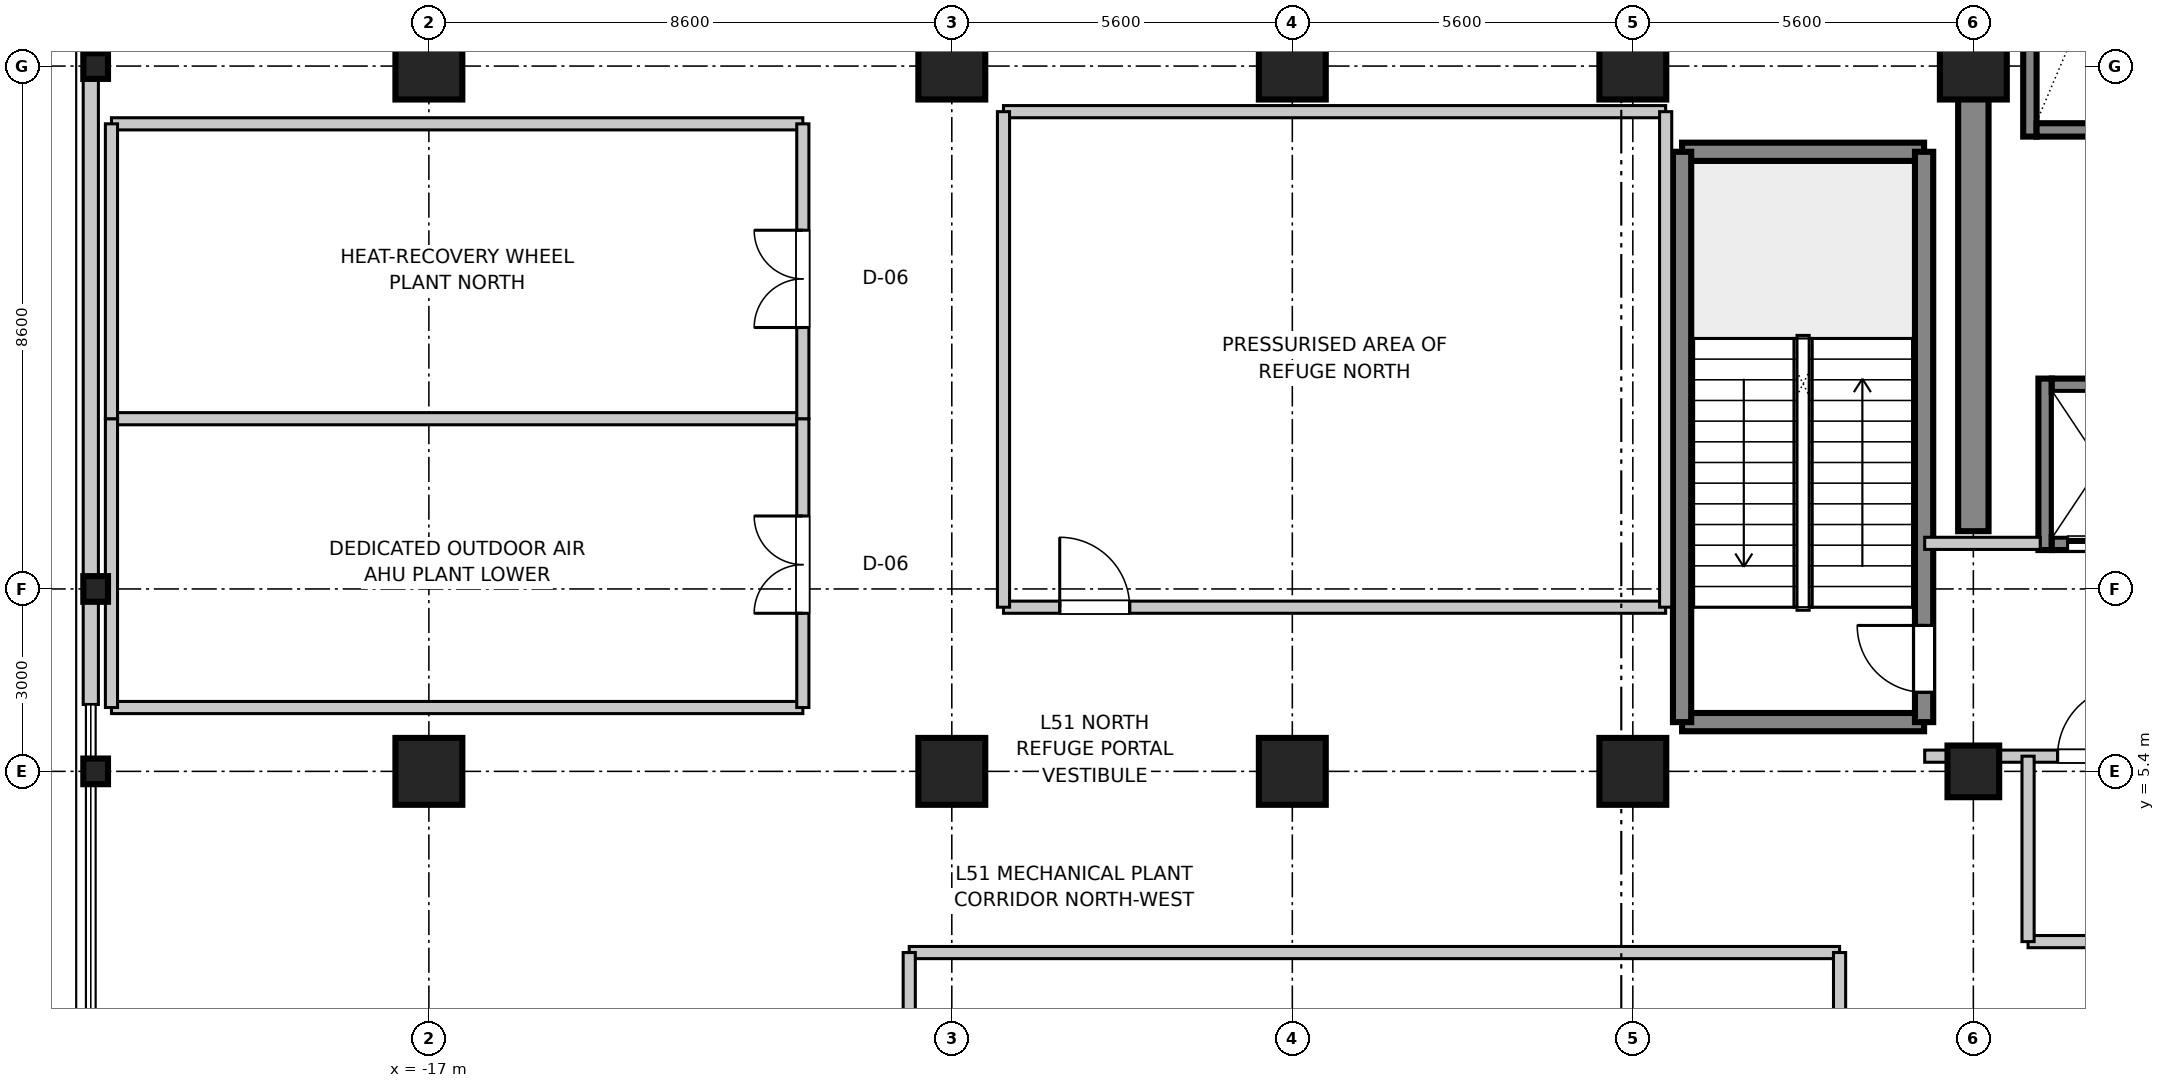
"""IFC4 building model, lengths in metres.
Left out: names, types, materials, properties, quantities, classifications, styles, units other than length and angle.
Written with IfcOpenShell. Run it as: python <this file> out.ifc"""

import sys

from ifc_helpers import new_model, si_unit, direction, frame, frame_2d, origin, origin_2d, place, context, subcontext, project, spatial, rectangle, i_section, extrude, source, transform, mapped, element, fill, save


model = new_model("IFC4")
c1 = context("Model", 3, precision=1e-05, world=origin(), true_north=direction((0.0, 1.0)))
c2 = subcontext(c1, "Body", "Model", "MODEL_VIEW")
j1 = project(units=[si_unit("LENGTHUNIT", "METRE"), si_unit("PLANEANGLEUNIT", "RADIAN")], contexts=[c1])
p1 = place(None, origin())
s1 = spatial("IfcSite", under=j1, at=p1, CompositionType="ELEMENT")
p2 = place(p1, origin())
s2 = spatial("IfcBuilding", under=s1, at=p2, CompositionType="ELEMENT")
p3 = place(p2, frame((0.0, 0.0, 200.1)))
s3 = spatial("IfcBuildingStorey", under=s2, at=p3, CompositionType="ELEMENT", Elevation=200.1)
m1 = source(origin(), c2, "Body", "SweptSolid", [
    extrude(rectangle(XDim=1.1, YDim=1.1, at=origin_2d()), origin(), (0.0, 0.0, 1.0), 4.755),
])
for number, where, z_axis, x_axis in (
    (1, (-17.0, 5.4, 0.0), (0.0, 0.0, 1.0), (1.0, 0.0, 0.0)),
    (2, (-17.0, 17.0, 0.0), (0.0, 0.0, 1.0), (1.0, 0.0, 0.0)),
    (3, (-8.4, 5.4, 0.0), (0.0, 0.0, 1.0), (1.0, 0.0, 0.0)),
    (4, (-8.4, 17.0, 0.0), (0.0, 0.0, 1.0), (1.0, 0.0, 0.0)),
    (5, (-2.8, 5.4, 0.0), (0.0, 0.0, 1.0), (1.0, 0.0, 0.0)),
    (6, (-2.8, 17.0, 0.0), (0.0, 0.0, 1.0), (1.0, 0.0, 0.0)),
    (7, (2.8, 5.4, 0.0), (0.0, 0.0, 1.0), (1.0, 0.0, 0.0)),
    (8, (2.8, 17.0, 0.0), (0.0, 0.0, 1.0), (1.0, 0.0, 0.0)),
):
    element("IfcColumn", number, at=place(p3, frame(where, z_axis=z_axis, x_axis=x_axis)), inside=s3, PredefinedType="COLUMN", context=c2, shape_type="MappedRepresentation", body=[
        mapped(m1, transform((0.0, 0.0, 0.0), scale=1.0)),
    ])
m2 = source(origin(), c2, "Body", "SweptSolid", [
    extrude(rectangle(XDim=0.85, YDim=0.85, at=origin_2d()), origin(), (0.0, 0.0, 1.0), 4.755),
])
p4 = place(p3, frame((8.4, 5.4, 0.0), z_axis=(0.0, 0.0, 1.0), x_axis=(1.0, 0.0, 0.0)))
e9 = element("IfcColumn", 9, at=p4, inside=s3, PredefinedType="PILASTER", context=c2, shape_type="MappedRepresentation", body=[
    mapped(m2, transform((0.0, 0.0, 0.0), scale=1.0)),
])
p5 = place(p3, frame((8.4, 17.0, 0.0), z_axis=(0.0, 0.0, 1.0), x_axis=(1.0, 0.0, 0.0)))
e10 = element("IfcColumn", 10, at=p5, inside=s3, PredefinedType="COLUMN", context=c2, shape_type="MappedRepresentation", body=[
    mapped(m1, transform((0.0, 0.0, 0.0), scale=1.0)),
])
m3 = source(origin(), c2, "Body", "SweptSolid", [
    extrude(i_section(OverallWidth=0.406, OverallDepth=0.422, WebThickness=0.019, FlangeThickness=0.03, at=origin_2d()), origin(), (0.0, 0.0, 1.0), 4.861),
])
for number, where, z_axis, x_axis in (
    (11, (-22.48, 5.4, 0.0), (-0.288, 0.0, 0.958), (0.0, -1.0, 0.0)),
    (12, (-22.48, 8.4, 0.0), (-0.288, 0.0, 0.958), (0.0, -1.0, 0.0)),
    (13, (-22.48, 17.0, 0.0), (-0.288, 0.0, 0.958), (0.0, -1.0, 0.0)),
):
    element("IfcColumn", number, at=place(p3, frame(where, z_axis=z_axis, x_axis=x_axis)), inside=s3, PredefinedType="COLUMN", context=c2, shape_type="MappedRepresentation", body=[
        mapped(m3, transform((0.0, 0.0, 0.0), scale=1.0)),
    ])
m4 = source(origin(), c2, "Body", "SweptSolid", [
    extrude(rectangle(XDim=7.65, YDim=0.5, at=frame_2d((3.825, 0.0))), origin(), (0.0, 0.0, 1.0), 4.51),
])
p6 = place(p3, frame((8.4, 9.35, 0.0), z_axis=(0.0, 0.0, 1.0), x_axis=(0.0, 1.0, 0.0)))
e14 = element("IfcWall", 14, at=p6, inside=s3, PredefinedType="SHEAR", context=c2, shape_type="MappedRepresentation", body=[
    mapped(m4, transform((0.0, 0.0, 0.0), scale=1.0)),
])
m5 = source(origin(), c2, "Body", "SweptSolid", [
    extrude(rectangle(XDim=3.98, YDim=0.3, at=frame_2d((1.99, 0.0))), origin(), (0.0, 0.0, 1.0), 4.51),
])
for number, where, z_axis, x_axis in (
    (15, (3.61, 6.21, 0.0), (0.0, 0.0, 1.0), (1.0, 0.0, 0.0)),
    (16, (3.61, 15.59, 0.0), (0.0, 0.0, 1.0), (1.0, 0.0, 0.0)),
):
    element("IfcWall", number, at=place(p3, frame(where, z_axis=z_axis, x_axis=x_axis)), inside=s3, PredefinedType="SHEAR", context=c2, shape_type="MappedRepresentation", body=[
        mapped(m5, transform((0.0, 0.0, 0.0), scale=1.0)),
    ])
m6 = source(origin(), c2, "Body", "SweptSolid", [
    extrude(rectangle(XDim=9.38, YDim=0.3, at=frame_2d((4.69, 0.0))), origin(), (0.0, 0.0, 1.0), 4.51),
])
p7 = place(p3, frame((3.61, 6.21, 0.0), z_axis=(0.0, 0.0, 1.0), x_axis=(0.0, 1.0, 0.0)))
e17 = element("IfcWall", 17, at=p7, inside=s3, PredefinedType="SHEAR", context=c2, shape_type="MappedRepresentation", body=[
    mapped(m6, transform((0.0, 0.0, 0.0), scale=1.0)),
])
p8 = place(p3, frame((7.59, 6.21, 0.0), z_axis=(0.0, 0.0, 1.0), x_axis=(0.0, 1.0, 0.0)))
e18 = element("IfcWall", 18, at=p8, inside=s3, PredefinedType="SHEAR", context=c2, shape_type="MappedRepresentation", body=[
    mapped(m6, transform((0.0, 0.0, 0.0), scale=1.0)),
])
p9 = place(p8, frame((0.49, 0.0, 0.0)))
e19 = element("IfcOpeningElement", 19, at=p9, cuts=e18, PredefinedType="OPENING", context=c2, shape_type="SweptSolid", body=[
    extrude(rectangle(XDim=1.1, YDim=2.15, at=frame_2d((0.55, 1.075))), frame((0.0, 0.16, 0.0), z_axis=(0.0, -1.0, 0.0), x_axis=(1.0, 0.0, 0.0)), (0.0, 0.0, 1.0), 0.32),
])
m7 = source(origin(), c2, "Body", "SweptSolid", [
    extrude(rectangle(XDim=2.385, YDim=0.22, at=frame_2d((1.192, 0.0))), origin(), (0.0, 0.0, 1.0), 4.51),
])
p10 = place(p3, frame((9.33, 15.84, 0.0), z_axis=(0.0, 0.0, 1.0), x_axis=(0.0, 1.0, 0.0)))
e20 = element("IfcWall", 20, at=p10, inside=s3, PredefinedType="SHEAR", context=c2, shape_type="MappedRepresentation", body=[
    mapped(m7, transform((0.0, 0.0, 0.0), scale=1.0)),
])
m8 = source(origin(), c2, "Body", "SweptSolid", [
    extrude(rectangle(XDim=1.82, YDim=0.22, at=frame_2d((0.91, 0.0))), origin(), (0.0, 0.0, 1.0), 4.51),
])
p11 = place(p3, frame((9.44, 15.95, 0.0), z_axis=(0.0, 0.0, 1.0), x_axis=(1.0, 0.0, 0.0)))
e21 = element("IfcWall", 21, at=p11, inside=s3, PredefinedType="SHEAR", context=c2, shape_type="MappedRepresentation", body=[
    mapped(m8, transform((0.0, 0.0, 0.0), scale=1.0)),
])
m9 = source(origin(), c2, "Body", "SweptSolid", [
    extrude(rectangle(XDim=2.82, YDim=0.22, at=frame_2d((1.41, 0.0))), origin(), (0.0, 0.0, 1.0), 4.51),
])
p12 = place(p3, frame((9.58, 9.04, 0.0), z_axis=(0.0, 0.0, 1.0), x_axis=(0.0, 1.0, 0.0)))
e22 = element("IfcWall", 22, at=p12, inside=s3, PredefinedType="SHEAR", context=c2, shape_type="MappedRepresentation", body=[
    mapped(m9, transform((0.0, 0.0, 0.0), scale=1.0)),
])
m10 = source(origin(), c2, "Body", "SweptSolid", [
    extrude(rectangle(XDim=1.62, YDim=0.22, at=frame_2d((0.81, 0.0))), origin(), (0.0, 0.0, 1.0), 4.51),
])
p13 = place(p3, frame((9.69, 9.15, 0.0), z_axis=(0.0, 0.0, 1.0), x_axis=(1.0, 0.0, 0.0)))
e23 = element("IfcWall", 23, at=p13, inside=s3, PredefinedType="SHEAR", context=c2, shape_type="MappedRepresentation", body=[
    mapped(m10, transform((0.0, 0.0, 0.0), scale=1.0)),
])
p14 = place(p13, frame((0.26, 0.0, 0.0)))
e24 = element("IfcOpeningElement", 24, at=p14, cuts=e23, PredefinedType="OPENING", context=c2, shape_type="SweptSolid", body=[
    extrude(rectangle(XDim=1.1, YDim=2.2, at=frame_2d((0.55, 1.1))), frame((0.0, 0.12, 0.0), z_axis=(0.0, -1.0, 0.0), x_axis=(1.0, 0.0, 0.0)), (0.0, 0.0, 1.0), 0.24),
])
p15 = place(p3, frame((9.69, 11.75, 0.0), z_axis=(0.0, 0.0, 1.0), x_axis=(1.0, 0.0, 0.0)))
e25 = element("IfcWall", 25, at=p15, inside=s3, PredefinedType="SHEAR", context=c2, shape_type="MappedRepresentation", body=[
    mapped(m10, transform((0.0, 0.0, 0.0), scale=1.0)),
])
m11 = source(origin(), c2, "Body", "SweptSolid", [
    extrude(rectangle(XDim=13.26, YDim=0.25, at=frame_2d((6.63, 0.0))), origin(), (0.0, 0.0, 1.0), 3.99),
])
p16 = place(p3, frame((-22.56, 6.5, 0.0), z_axis=(0.0, 0.0, 1.0), x_axis=(0.0, 1.0, 0.0)))
e26 = element("IfcWall", 26, at=p16, inside=s3, PredefinedType="STANDARD", context=c2, shape_type="MappedRepresentation", body=[
    mapped(m11, transform((0.0, 0.0, 0.0), scale=1.0)),
])
m12 = source(origin(), c2, "Body", "SweptSolid", [
    extrude(rectangle(XDim=3.82, YDim=0.2, at=frame_2d((1.91, 0.0))), origin(), (0.0, 0.0, 1.0), 3.4),
])
p17 = place(p3, frame((7.6, 5.65, 0.0), z_axis=(0.0, 0.0, 1.0), x_axis=(1.0, 0.0, 0.0)))
e27 = element("IfcWall", 27, at=p17, inside=s3, PredefinedType="PARTITIONING", context=c2, shape_type="MappedRepresentation", body=[
    mapped(m12, transform((0.0, 0.0, 0.0), scale=1.0)),
])
p18 = place(p17, frame((2.185, 0.0, 0.0)))
e28 = element("IfcOpeningElement", 28, at=p18, cuts=e27, PredefinedType="OPENING", context=c2, shape_type="SweptSolid", body=[
    extrude(rectangle(XDim=1.15, YDim=2.15, at=frame_2d((0.575, 1.075))), frame((0.0, 0.11, 0.0), z_axis=(0.0, -1.0, 0.0), x_axis=(1.0, 0.0, 0.0)), (0.0, 0.0, 1.0), 0.22),
])
m13 = source(origin(), c2, "Body", "SweptSolid", [
    extrude(rectangle(XDim=1.9, YDim=0.2, at=frame_2d((0.95, 0.0))), origin(), (0.0, 0.0, 1.0), 3.4),
])
p19 = place(p3, frame((7.6, 9.15, 0.0), z_axis=(0.0, 0.0, 1.0), x_axis=(1.0, 0.0, 0.0)))
e29 = element("IfcWall", 29, at=p19, inside=s3, PredefinedType="PARTITIONING", context=c2, shape_type="MappedRepresentation", body=[
    mapped(m13, transform((0.0, 0.0, 0.0), scale=1.0)),
])
m14 = source(origin(), c2, "Body", "SweptSolid", [
    extrude(rectangle(XDim=2.12, YDim=0.2, at=frame_2d((1.06, 0.0))), origin(), (0.0, 0.0, 1.0), 3.4),
])
p20 = place(p3, frame((9.3, 2.6, 0.0), z_axis=(0.0, 0.0, 1.0), x_axis=(1.0, 0.0, 0.0)))
e30 = element("IfcWall", 30, at=p20, inside=s3, PredefinedType="PARTITIONING", context=c2, shape_type="MappedRepresentation", body=[
    mapped(m14, transform((0.0, 0.0, 0.0), scale=1.0)),
])
m15 = source(origin(), c2, "Body", "SweptSolid", [
    extrude(rectangle(XDim=3.05, YDim=0.2, at=frame_2d((1.525, 0.0))), origin(), (0.0, 0.0, 1.0), 3.4),
])
p21 = place(p3, frame((9.3, 2.6, 0.0), z_axis=(0.0, 0.0, 1.0), x_axis=(0.0, 1.0, 0.0)))
e31 = element("IfcWall", 31, at=p21, inside=s3, PredefinedType="PARTITIONING", context=c2, shape_type="MappedRepresentation", body=[
    mapped(m15, transform((0.0, 0.0, 0.0), scale=1.0)),
])
m16 = source(origin(), c2, "Body", "SweptSolid", [
    extrude(rectangle(XDim=10.89, YDim=0.2, at=frame_2d((5.445, 0.0))), origin(), (0.0, 0.0, 1.0), 3.4),
])
p22 = place(p3, frame((-7.55, 8.1, 0.0), z_axis=(0.0, 0.0, 1.0), x_axis=(1.0, 0.0, 0.0)))
e32 = element("IfcWall", 32, at=p22, inside=s3, PredefinedType="PARTITIONING", context=c2, shape_type="MappedRepresentation", body=[
    mapped(m16, transform((0.0, 0.0, 0.0), scale=1.0)),
])
p23 = place(p22, frame((0.925, 0.0, 0.0)))
e33 = element("IfcOpeningElement", 33, at=p23, cuts=e32, PredefinedType="OPENING", context=c2, shape_type="SweptSolid", body=[
    extrude(rectangle(XDim=1.15, YDim=2.15, at=frame_2d((0.575, 1.075))), frame((0.0, 0.11, 0.0), z_axis=(0.0, -1.0, 0.0), x_axis=(1.0, 0.0, 0.0)), (0.0, 0.0, 1.0), 0.22),
])
p24 = place(p3, frame((-7.55, 16.25, 0.0), z_axis=(0.0, 0.0, 1.0), x_axis=(1.0, 0.0, 0.0)))
e34 = element("IfcWall", 34, at=p24, inside=s3, PredefinedType="PARTITIONING", context=c2, shape_type="MappedRepresentation", body=[
    mapped(m16, transform((0.0, 0.0, 0.0), scale=1.0)),
])
m17 = source(origin(), c2, "Body", "SweptSolid", [
    extrude(rectangle(XDim=8.15, YDim=0.2, at=frame_2d((4.075, 0.0))), origin(), (0.0, 0.0, 1.0), 3.4),
])
for number, where, z_axis, x_axis in (
    (35, (-7.55, 8.1, 0.0), (0.0, 0.0, 1.0), (0.0, 1.0, 0.0)),
    (36, (3.34, 8.1, 0.0), (0.0, 0.0, 1.0), (0.0, 1.0, 0.0)),
):
    element("IfcWall", number, at=place(p3, frame(where, z_axis=z_axis, x_axis=x_axis)), inside=s3, PredefinedType="PARTITIONING", context=c2, shape_type="MappedRepresentation", body=[
        mapped(m17, transform((0.0, 0.0, 0.0), scale=1.0)),
    ])
m18 = source(origin(), c2, "Body", "SweptSolid", [
    extrude(rectangle(XDim=15.3, YDim=0.2, at=frame_2d((7.65, 0.0))), origin(), (0.0, 0.0, 1.0), 3.4),
])
p25 = place(p3, frame((-9.1, 2.42, 0.0), z_axis=(0.0, 0.0, 1.0), x_axis=(1.0, 0.0, 0.0)))
e37 = element("IfcWall", 37, at=p25, inside=s3, PredefinedType="PARTITIONING", context=c2, shape_type="MappedRepresentation", body=[
    mapped(m18, transform((0.0, 0.0, 0.0), scale=1.0)),
])
m19 = source(origin(), c2, "Body", "SweptSolid", [
    extrude(rectangle(XDim=4.84, YDim=0.2, at=frame_2d((2.42, 0.0))), origin(), (0.0, 0.0, 1.0), 3.4),
])
for number, where, z_axis, x_axis in (
    (38, (-9.1, -2.42, 0.0), (0.0, 0.0, 1.0), (0.0, 1.0, 0.0)),
    (39, (6.2, -2.42, 0.0), (0.0, 0.0, 1.0), (0.0, 1.0, 0.0)),
):
    element("IfcWall", number, at=place(p3, frame(where, z_axis=z_axis, x_axis=x_axis)), inside=s3, PredefinedType="PARTITIONING", context=c2, shape_type="MappedRepresentation", body=[
        mapped(m19, transform((0.0, 0.0, 0.0), scale=1.0)),
    ])
m20 = source(origin(), c2, "Body", "SweptSolid", [
    extrude(rectangle(XDim=11.37, YDim=0.2, at=frame_2d((5.685, 0.0))), origin(), (0.0, 0.0, 1.0), 3.4),
])
for number, where, z_axis, x_axis in (
    (40, (-22.22, 6.45, 0.0), (0.0, 0.0, 1.0), (1.0, 0.0, 0.0)),
    (41, (-22.22, 11.2, 0.0), (0.0, 0.0, 1.0), (1.0, 0.0, 0.0)),
):
    element("IfcWall", number, at=place(p3, frame(where, z_axis=z_axis, x_axis=x_axis)), inside=s3, PredefinedType="PARTITIONING", context=c2, shape_type="MappedRepresentation", body=[
        mapped(m20, transform((0.0, 0.0, 0.0), scale=1.0)),
    ])
m21 = source(origin(), c2, "Body", "SweptSolid", [
    extrude(rectangle(XDim=4.75, YDim=0.2, at=frame_2d((2.375, 0.0))), origin(), (0.0, 0.0, 1.0), 3.4),
])
p26 = place(p3, frame((-22.22, 6.45, 0.0), z_axis=(0.0, 0.0, 1.0), x_axis=(0.0, 1.0, 0.0)))
e42 = element("IfcWall", 42, at=p26, inside=s3, PredefinedType="PARTITIONING", context=c2, shape_type="MappedRepresentation", body=[
    mapped(m21, transform((0.0, 0.0, 0.0), scale=1.0)),
])
p27 = place(p3, frame((-10.85, 6.45, 0.0), z_axis=(0.0, 0.0, 1.0), x_axis=(0.0, 1.0, 0.0)))
e43 = element("IfcWall", 43, at=p27, inside=s3, PredefinedType="PARTITIONING", context=c2, shape_type="MappedRepresentation", body=[
    mapped(m21, transform((0.0, 0.0, 0.0), scale=1.0)),
])
p28 = place(p27, frame((1.55, 0.0, 0.0)))
e44 = element("IfcOpeningElement", 44, at=p28, cuts=e43, PredefinedType="OPENING", context=c2, shape_type="SweptSolid", body=[
    extrude(rectangle(XDim=1.6, YDim=2.15, at=frame_2d((0.8, 1.075))), frame((0.0, 0.11, 0.0), z_axis=(0.0, -1.0, 0.0), x_axis=(1.0, 0.0, 0.0)), (0.0, 0.0, 1.0), 0.22),
])
p29 = place(p3, frame((-22.22, 16.05, 0.0), z_axis=(0.0, 0.0, 1.0), x_axis=(1.0, 0.0, 0.0)))
e45 = element("IfcWall", 45, at=p29, inside=s3, PredefinedType="PARTITIONING", context=c2, shape_type="MappedRepresentation", body=[
    mapped(m20, transform((0.0, 0.0, 0.0), scale=1.0)),
])
m22 = source(origin(), c2, "Body", "SweptSolid", [
    extrude(rectangle(XDim=4.85, YDim=0.2, at=frame_2d((2.425, 0.0))), origin(), (0.0, 0.0, 1.0), 3.4),
])
p30 = place(p3, frame((-22.22, 11.2, 0.0), z_axis=(0.0, 0.0, 1.0), x_axis=(0.0, 1.0, 0.0)))
e46 = element("IfcWall", 46, at=p30, inside=s3, PredefinedType="PARTITIONING", context=c2, shape_type="MappedRepresentation", body=[
    mapped(m22, transform((0.0, 0.0, 0.0), scale=1.0)),
])
p31 = place(p3, frame((-10.85, 11.2, 0.0), z_axis=(0.0, 0.0, 1.0), x_axis=(0.0, 1.0, 0.0)))
e47 = element("IfcWall", 47, at=p31, inside=s3, PredefinedType="PARTITIONING", context=c2, shape_type="MappedRepresentation", body=[
    mapped(m22, transform((0.0, 0.0, 0.0), scale=1.0)),
])
p32 = place(p31, frame((1.5, 0.0, 0.0)))
e48 = element("IfcOpeningElement", 48, at=p32, cuts=e47, PredefinedType="OPENING", context=c2, shape_type="SweptSolid", body=[
    extrude(rectangle(XDim=1.6, YDim=2.15, at=frame_2d((0.8, 1.075))), frame((0.0, 0.11, 0.0), z_axis=(0.0, -1.0, 0.0), x_axis=(1.0, 0.0, 0.0)), (0.0, 0.0, 1.0), 0.22),
])
m23 = source(origin(), c2, "Body", "SweptSolid", [
    extrude(rectangle(XDim=1.1, YDim=2.15, at=frame_2d((0.55, 1.075))), frame((0.0, 0.025, 0.0), z_axis=(0.0, -1.0, 0.0), x_axis=(1.0, 0.0, 0.0)), (0.0, 0.0, 1.0), 0.05),
])
p33 = place(p9, origin())
e49 = element("IfcDoor", 49, at=p33, inside=s3, OperationType="SINGLE_SWING_RIGHT", PredefinedType="DOOR", context=c2, shape_type="MappedRepresentation", body=[
    mapped(m23, transform((0.0, 0.0, 0.0), scale=1.0)),
])
fill(e19, e49)
m24 = source(origin(), c2, "Body", "SweptSolid", [
    extrude(rectangle(XDim=1.1, YDim=2.2, at=frame_2d((0.55, 1.1))), frame((0.0, 0.025, 0.0), z_axis=(0.0, -1.0, 0.0), x_axis=(1.0, 0.0, 0.0)), (0.0, 0.0, 1.0), 0.05),
])
p34 = place(p14, frame((1.1, 0.0, 0.0), z_axis=(0.0, 0.0, 1.0), x_axis=(-1.0, 0.0, 0.0)))
e50 = element("IfcDoor", 50, at=p34, inside=s3, OperationType="DOUBLE_DOOR_SLIDING", PredefinedType="DOOR", context=c2, shape_type="MappedRepresentation", body=[
    mapped(m24, transform((0.0, 0.0, 0.0), scale=1.0)),
])
fill(e24, e50)
m25 = source(origin(), c2, "Body", "SweptSolid", [
    extrude(rectangle(XDim=1.15, YDim=2.15, at=frame_2d((0.575, 1.075))), frame((0.0, 0.025, 0.0), z_axis=(0.0, -1.0, 0.0), x_axis=(1.0, 0.0, 0.0)), (0.0, 0.0, 1.0), 0.05),
])
p35 = place(p18, frame((1.15, 0.0, 0.0), z_axis=(0.0, 0.0, 1.0), x_axis=(-1.0, 0.0, 0.0)))
e51 = element("IfcDoor", 51, at=p35, inside=s3, OperationType="SINGLE_SWING_RIGHT", PredefinedType="DOOR", context=c2, shape_type="MappedRepresentation", body=[
    mapped(m25, transform((0.0, 0.0, 0.0), scale=1.0)),
])
fill(e28, e51)
p36 = place(p23, origin())
e52 = element("IfcDoor", 52, at=p36, inside=s3, OperationType="SINGLE_SWING_LEFT", PredefinedType="DOOR", context=c2, shape_type="MappedRepresentation", body=[
    mapped(m25, transform((0.0, 0.0, 0.0), scale=1.0)),
])
fill(e33, e52)
m26 = source(origin(), c2, "Body", "SweptSolid", [
    extrude(rectangle(XDim=1.6, YDim=2.15, at=frame_2d((0.8, 1.075))), frame((0.0, 0.025, 0.0), z_axis=(0.0, -1.0, 0.0), x_axis=(1.0, 0.0, 0.0)), (0.0, 0.0, 1.0), 0.05),
])
p37 = place(p28, origin())
e53 = element("IfcDoor", 53, at=p37, inside=s3, OperationType="DOUBLE_DOOR_SINGLE_SWING", PredefinedType="DOOR", context=c2, shape_type="MappedRepresentation", body=[
    mapped(m26, transform((0.0, 0.0, 0.0), scale=1.0)),
])
fill(e44, e53)
p38 = place(p32, origin())
e54 = element("IfcDoor", 54, at=p38, inside=s3, OperationType="DOUBLE_DOOR_SINGLE_SWING", PredefinedType="DOOR", context=c2, shape_type="MappedRepresentation", body=[
    mapped(m26, transform((0.0, 0.0, 0.0), scale=1.0)),
])
fill(e48, e54)
save(model, sys.argv[1])
